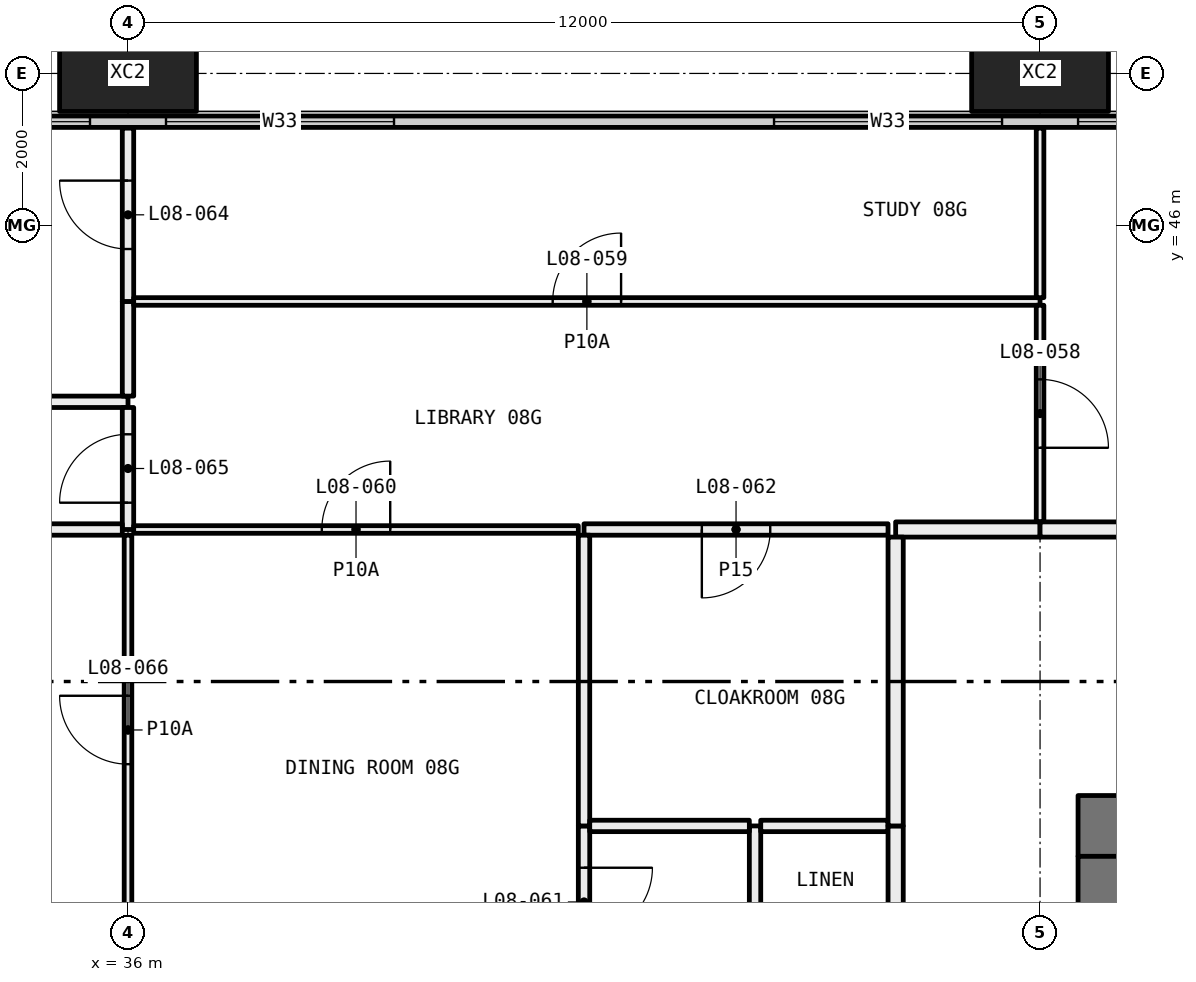
"""IFC4 building model, lengths in metres.
Left out: names, types, materials, properties, quantities, classifications, styles, units other than length and angle.
Written with IfcOpenShell. Run it as: python <this file> out.ifc"""

import sys

from ifc_helpers import new_model, si_unit, direction, frame, frame_2d, origin, origin_2d, place, context, subcontext, project, spatial, rectangle, hollow_rectangle, extrude, element, fill, save


model = new_model("IFC4")
c1 = context("Model", 3, precision=1e-05, world=origin(), true_north=direction((0.0, 1.0)))
c2 = subcontext(c1, "Body", "Model", "MODEL_VIEW")
j1 = project(units=[si_unit("LENGTHUNIT", "METRE"), si_unit("PLANEANGLEUNIT", "RADIAN")], contexts=[c1])
p1 = place(None, origin())
s1 = spatial("IfcSite", under=j1, at=p1, CompositionType="ELEMENT")
p2 = place(p1, origin())
s2 = spatial("IfcBuilding", under=s1, at=p2, CompositionType="ELEMENT")
p3 = place(p2, frame((0.0, 0.0, 40.35)))
s3 = spatial("IfcBuildingStorey", under=s2, at=p3, CompositionType="ELEMENT", Elevation=40.35)
for number, where, z_axis, x_axis in (
    (1, (36.0, 48.0, -0.4), (0.0, 0.0, 1.0), (1.0, 0.0, 0.0)),
    (2, (48.0, 48.0, -0.4), (0.0, 0.0, 1.0), (1.0, 0.0, 0.0)),
):
    element("IfcColumn", number, at=place(p3, frame(where, z_axis=z_axis, x_axis=x_axis)), inside=s3, PredefinedType="COLUMN", context=c2, shape_type="SweptSolid", body=[
        extrude(hollow_rectangle(XDim=1.8, YDim=1.0, WallThickness=0.07, at=origin_2d()), origin(), (0.0, 0.0, 1.0), 3.45),
    ])
p4 = place(p3, frame((6.56, 47.365, 0.0), z_axis=(0.0, 0.0, 1.0), x_axis=(1.0, 0.0, 0.0)))
e3 = element("IfcWall", 3, at=p4, inside=s3, PredefinedType="ELEMENTEDWALL", context=c2, shape_type="SweptSolid", body=[
    extrude(rectangle(XDim=58.88, YDim=0.15, at=frame_2d((29.44, 0.0))), origin(), (0.0, 0.0, 1.0), 3.05),
])
p5 = place(p4, frame((0.44, 0.0, 0.45)))
e4 = element("IfcOpeningElement", 4, at=p5, cuts=e3, PredefinedType="OPENING", context=c2, shape_type="SweptSolid", body=[
    extrude(rectangle(XDim=4.5, YDim=2.55, at=frame_2d((2.25, 1.275))), frame((0.0, 0.085, 0.0), z_axis=(0.0, -1.0, 0.0), x_axis=(1.0, 0.0, 0.0)), (0.0, 0.0, 1.0), 0.17),
])
p6 = place(p4, frame((5.94, 0.0, 0.45)))
e5 = element("IfcOpeningElement", 5, at=p6, cuts=e3, PredefinedType="OPENING", context=c2, shape_type="SweptSolid", body=[
    extrude(rectangle(XDim=3.0, YDim=2.55, at=frame_2d((1.5, 1.275))), frame((0.0, 0.085, 0.0), z_axis=(0.0, -1.0, 0.0), x_axis=(1.0, 0.0, 0.0)), (0.0, 0.0, 1.0), 0.17),
])
p7 = place(p4, frame((13.94, 0.0, 0.45)))
e6 = element("IfcOpeningElement", 6, at=p7, cuts=e3, PredefinedType="OPENING", context=c2, shape_type="SweptSolid", body=[
    extrude(rectangle(XDim=3.0, YDim=2.55, at=frame_2d((1.5, 1.275))), frame((0.0, 0.085, 0.0), z_axis=(0.0, -1.0, 0.0), x_axis=(1.0, 0.0, 0.0)), (0.0, 0.0, 1.0), 0.17),
])
p8 = place(p4, frame((17.94, 0.0, 0.45)))
e7 = element("IfcOpeningElement", 7, at=p8, cuts=e3, PredefinedType="OPENING", context=c2, shape_type="SweptSolid", body=[
    extrude(rectangle(XDim=3.0, YDim=2.55, at=frame_2d((1.5, 1.275))), frame((0.0, 0.085, 0.0), z_axis=(0.0, -1.0, 0.0), x_axis=(1.0, 0.0, 0.0)), (0.0, 0.0, 1.0), 0.17),
])
p9 = place(p4, frame((26.94, 0.0, 0.45)))
e8 = element("IfcOpeningElement", 8, at=p9, cuts=e3, PredefinedType="OPENING", context=c2, shape_type="SweptSolid", body=[
    extrude(rectangle(XDim=2.0, YDim=2.55, at=frame_2d((1.0, 1.275))), frame((0.0, 0.085, 0.0), z_axis=(0.0, -1.0, 0.0), x_axis=(1.0, 0.0, 0.0)), (0.0, 0.0, 1.0), 0.17),
])
p10 = place(p4, frame((29.94, 0.0, 0.45)))
e9 = element("IfcOpeningElement", 9, at=p10, cuts=e3, PredefinedType="OPENING", context=c2, shape_type="SweptSolid", body=[
    extrude(rectangle(XDim=3.0, YDim=2.55, at=frame_2d((1.5, 1.275))), frame((0.0, 0.085, 0.0), z_axis=(0.0, -1.0, 0.0), x_axis=(1.0, 0.0, 0.0)), (0.0, 0.0, 1.0), 0.17),
])
p11 = place(p4, frame((37.94, 0.0, 0.45)))
e10 = element("IfcOpeningElement", 10, at=p11, cuts=e3, PredefinedType="OPENING", context=c2, shape_type="SweptSolid", body=[
    extrude(rectangle(XDim=3.0, YDim=2.55, at=frame_2d((1.5, 1.275))), frame((0.0, 0.085, 0.0), z_axis=(0.0, -1.0, 0.0), x_axis=(1.0, 0.0, 0.0)), (0.0, 0.0, 1.0), 0.17),
])
p12 = place(p4, frame((41.94, 0.0, 0.45)))
e11 = element("IfcOpeningElement", 11, at=p12, cuts=e3, PredefinedType="OPENING", context=c2, shape_type="SweptSolid", body=[
    extrude(rectangle(XDim=3.0, YDim=2.55, at=frame_2d((1.5, 1.275))), frame((0.0, 0.085, 0.0), z_axis=(0.0, -1.0, 0.0), x_axis=(1.0, 0.0, 0.0)), (0.0, 0.0, 1.0), 0.17),
])
p13 = place(p4, frame((50.94, 0.0, 0.45)))
e12 = element("IfcOpeningElement", 12, at=p13, cuts=e3, PredefinedType="OPENING", context=c2, shape_type="SweptSolid", body=[
    extrude(rectangle(XDim=2.0, YDim=2.55, at=frame_2d((1.0, 1.275))), frame((0.0, 0.085, 0.0), z_axis=(0.0, -1.0, 0.0), x_axis=(1.0, 0.0, 0.0)), (0.0, 0.0, 1.0), 0.17),
])
p14 = place(p4, frame((53.94, 0.0, 0.45)))
e13 = element("IfcOpeningElement", 13, at=p14, cuts=e3, PredefinedType="OPENING", context=c2, shape_type="SweptSolid", body=[
    extrude(rectangle(XDim=4.5, YDim=2.55, at=frame_2d((2.25, 1.275))), frame((0.0, 0.085, 0.0), z_axis=(0.0, -1.0, 0.0), x_axis=(1.0, 0.0, 0.0)), (0.0, 0.0, 1.0), 0.17),
])
p15 = place(p3, frame((30.1, 43.68, 0.0), z_axis=(0.0, 0.0, 1.0), x_axis=(1.0, 0.0, 0.0)))
e14 = element("IfcWall", 14, at=p15, inside=s3, PredefinedType="PARTITIONING", context=c2, shape_type="SweptSolid", body=[
    extrude(rectangle(XDim=5.9, YDim=0.15, at=frame_2d((2.95, 0.0))), origin(), (0.0, 0.0, 1.0), 2.45),
])
p16 = place(p3, frame((36.0, 43.755, 0.0), z_axis=(0.0, 0.0, 1.0), x_axis=(0.0, 1.0, 0.0)))
e15 = element("IfcWall", 15, at=p16, inside=s3, PredefinedType="PARTITIONING", context=c2, shape_type="SweptSolid", body=[
    extrude(rectangle(XDim=1.245, YDim=0.15, at=frame_2d((0.623, 0.0))), origin(), (0.0, 0.0, 1.0), 2.45),
])
p17 = place(p3, frame((36.0, 45.0, 0.0), z_axis=(0.0, 0.0, 1.0), x_axis=(0.0, 1.0, 0.0)))
e16 = element("IfcWall", 16, at=p17, inside=s3, PredefinedType="PARTITIONING", context=c2, shape_type="SweptSolid", body=[
    extrude(rectangle(XDim=2.28, YDim=0.15, at=frame_2d((1.14, 0.0))), origin(), (0.0, 0.0, 1.0), 2.45),
])
p18 = place(p17, frame((0.69, 0.0, 0.0)))
e17 = element("IfcOpeningElement", 17, at=p18, cuts=e16, PredefinedType="OPENING", context=c2, shape_type="SweptSolid", body=[
    extrude(rectangle(XDim=0.9, YDim=2.1, at=frame_2d((0.45, 1.05))), frame((0.0, 0.085, 0.0), z_axis=(0.0, -1.0, 0.0), x_axis=(1.0, 0.0, 0.0)), (0.0, 0.0, 1.0), 0.17),
])
p19 = place(p3, frame((36.0, 42.0, 0.0), z_axis=(0.0, 0.0, 1.0), x_axis=(0.0, 1.0, 0.0)))
e18 = element("IfcWall", 18, at=p19, inside=s3, PredefinedType="PARTITIONING", context=c2, shape_type="SweptSolid", body=[
    extrude(rectangle(XDim=1.605, YDim=0.15, at=frame_2d((0.802, 0.0))), origin(), (0.0, 0.0, 1.0), 2.45),
])
p20 = place(p19, frame((0.353, 0.0, 0.0)))
e19 = element("IfcOpeningElement", 19, at=p20, cuts=e18, PredefinedType="OPENING", context=c2, shape_type="SweptSolid", body=[
    extrude(rectangle(XDim=0.9, YDim=2.1, at=frame_2d((0.45, 1.05))), frame((0.0, 0.085, 0.0), z_axis=(0.0, -1.0, 0.0), x_axis=(1.0, 0.0, 0.0)), (0.0, 0.0, 1.0), 0.17),
])
p21 = place(p3, frame((30.1, 42.0, 0.0), z_axis=(0.0, 0.0, 1.0), x_axis=(1.0, 0.0, 0.0)))
e20 = element("IfcWall", 20, at=p21, inside=s3, PredefinedType="PARTITIONING", context=c2, shape_type="SweptSolid", body=[
    extrude(rectangle(XDim=5.825, YDim=0.15, at=frame_2d((2.913, 0.0))), origin(), (0.0, 0.0, 1.0), 2.45),
])
p22 = place(p3, frame((48.0, 45.0, 0.0), z_axis=(0.0, 0.0, 1.0), x_axis=(-1.0, 0.0, 0.0)))
e21 = element("IfcWall", 21, at=p22, inside=s3, PredefinedType="PARTITIONING", context=c2, shape_type="SweptSolid", body=[
    extrude(rectangle(XDim=11.925, YDim=0.1, at=frame_2d((5.962, 0.0))), origin(), (0.0, 0.0, 1.0), 2.45),
])
p23 = place(p22, frame((5.512, 0.0, 0.0)))
e22 = element("IfcOpeningElement", 22, at=p23, cuts=e21, PredefinedType="OPENING", context=c2, shape_type="SweptSolid", body=[
    extrude(rectangle(XDim=0.9, YDim=2.1, at=frame_2d((0.45, 1.05))), frame((0.0, 0.06, 0.0), z_axis=(0.0, -1.0, 0.0), x_axis=(1.0, 0.0, 0.0)), (0.0, 0.0, 1.0), 0.12),
])
p24 = place(p3, frame((48.0, 42.1, 0.0), z_axis=(0.0, 0.0, 1.0), x_axis=(0.0, 1.0, 0.0)))
e23 = element("IfcWall", 23, at=p24, inside=s3, PredefinedType="PARTITIONING", context=c2, shape_type="SweptSolid", body=[
    extrude(rectangle(XDim=2.85, YDim=0.1, at=frame_2d((1.425, 0.0))), origin(), (0.0, 0.0, 1.0), 3.05),
])
p25 = place(p24, frame((0.975, 0.0, 0.0)))
e24 = element("IfcOpeningElement", 24, at=p25, cuts=e23, PredefinedType="OPENING", context=c2, shape_type="SweptSolid", body=[
    extrude(rectangle(XDim=0.9, YDim=2.1, at=frame_2d((0.45, 1.05))), frame((0.0, 0.06, 0.0), z_axis=(0.0, -1.0, 0.0), x_axis=(1.0, 0.0, 0.0)), (0.0, 0.0, 1.0), 0.12),
])
p26 = place(p3, frame((36.075, 42.0, 0.0), z_axis=(0.0, 0.0, 1.0), x_axis=(1.0, 0.0, 0.0)))
e25 = element("IfcWall", 25, at=p26, inside=s3, PredefinedType="PARTITIONING", context=c2, shape_type="SweptSolid", body=[
    extrude(rectangle(XDim=5.85, YDim=0.1, at=frame_2d((2.925, 0.0))), origin(), (0.0, 0.0, 1.0), 2.45),
])
p27 = place(p26, frame((2.475, 0.0, 0.0)))
e26 = element("IfcOpeningElement", 26, at=p27, cuts=e25, PredefinedType="OPENING", context=c2, shape_type="SweptSolid", body=[
    extrude(rectangle(XDim=0.9, YDim=2.1, at=frame_2d((0.45, 1.05))), frame((0.0, 0.06, 0.0), z_axis=(0.0, -1.0, 0.0), x_axis=(1.0, 0.0, 0.0)), (0.0, 0.0, 1.0), 0.12),
])
p28 = place(p3, frame((42.0, 42.0, 0.0), z_axis=(0.0, 0.0, 1.0), x_axis=(1.0, 0.0, 0.0)))
e27 = element("IfcWall", 27, at=p28, inside=s3, PredefinedType="PARTITIONING", context=c2, shape_type="SweptSolid", body=[
    extrude(rectangle(XDim=4.0, YDim=0.15, at=frame_2d((2.0, 0.0))), origin(), (0.0, 0.0, 1.0), 3.05),
])
p29 = place(p28, frame((1.55, 0.0, 0.0)))
e28 = element("IfcOpeningElement", 28, at=p29, cuts=e27, PredefinedType="OPENING", context=c2, shape_type="SweptSolid", body=[
    extrude(rectangle(XDim=0.9, YDim=2.1, at=frame_2d((0.45, 1.05))), frame((0.0, 0.085, 0.0), z_axis=(0.0, -1.0, 0.0), x_axis=(1.0, 0.0, 0.0)), (0.0, 0.0, 1.0), 0.17),
])
p30 = place(p3, frame((46.1, 42.0, 0.0), z_axis=(0.0, 0.0, 1.0), x_axis=(1.0, 0.0, 0.0)))
e29 = element("IfcWall", 29, at=p30, inside=s3, PredefinedType="PARTITIONING", context=c2, shape_type="SweptSolid", body=[
    extrude(rectangle(XDim=1.9, YDim=0.2, at=frame_2d((0.95, 0.0))), origin(), (0.0, 0.0, 1.0), 3.05),
])
p31 = place(p3, frame((48.0, 45.05, 0.0), z_axis=(0.0, 0.0, 1.0), x_axis=(0.0, 1.0, 0.0)))
e30 = element("IfcWall", 30, at=p31, inside=s3, PredefinedType="PARTITIONING", context=c2, shape_type="SweptSolid", body=[
    extrude(rectangle(XDim=2.23, YDim=0.1, at=frame_2d((1.115, 0.0))), origin(), (0.0, 0.0, 1.0), 3.05),
])
p32 = place(p3, frame((48.0, 42.0, 0.0), z_axis=(0.0, 0.0, 1.0), x_axis=(1.0, 0.0, 0.0)))
e31 = element("IfcWall", 31, at=p32, inside=s3, PredefinedType="PARTITIONING", context=c2, shape_type="SweptSolid", body=[
    extrude(rectangle(XDim=6.0, YDim=0.2, at=frame_2d((3.0, 0.0))), origin(), (0.0, 0.0, 1.0), 3.05),
])
p33 = place(p3, frame((36.0, 36.8, 0.0), z_axis=(0.0, 0.0, 1.0), x_axis=(0.0, 1.0, 0.0)))
e32 = element("IfcWall", 32, at=p33, inside=s3, PredefinedType="PARTITIONING", context=c2, shape_type="SweptSolid", body=[
    extrude(rectangle(XDim=5.125, YDim=0.1, at=frame_2d((2.562, 0.0))), origin(), (0.0, 0.0, 1.0), 2.45),
])
p34 = place(p33, frame((2.113, 0.0, 0.0)))
e33 = element("IfcOpeningElement", 33, at=p34, cuts=e32, PredefinedType="OPENING", context=c2, shape_type="SweptSolid", body=[
    extrude(rectangle(XDim=0.9, YDim=2.1, at=frame_2d((0.45, 1.05))), frame((0.0, 0.06, 0.0), z_axis=(0.0, -1.0, 0.0), x_axis=(1.0, 0.0, 0.0)), (0.0, 0.0, 1.0), 0.12),
])
p35 = place(p3, frame((42.0, 36.1, 0.0), z_axis=(0.0, 0.0, 1.0), x_axis=(0.0, 1.0, 0.0)))
e34 = element("IfcWall", 34, at=p35, inside=s3, PredefinedType="PARTITIONING", context=c2, shape_type="SweptSolid", body=[
    extrude(rectangle(XDim=2.0, YDim=0.15, at=frame_2d((1.0, 0.0))), origin(), (0.0, 0.0, 1.0), 3.05),
])
p36 = place(p35, frame((0.55, 0.0, 0.0)))
e35 = element("IfcOpeningElement", 35, at=p36, cuts=e34, PredefinedType="OPENING", context=c2, shape_type="SweptSolid", body=[
    extrude(rectangle(XDim=0.9, YDim=2.1, at=frame_2d((0.45, 1.05))), frame((0.0, 0.085, 0.0), z_axis=(0.0, -1.0, 0.0), x_axis=(1.0, 0.0, 0.0)), (0.0, 0.0, 1.0), 0.17),
])
p37 = place(p3, frame((42.0, 38.1, 0.0), z_axis=(0.0, 0.0, 1.0), x_axis=(0.0, 1.0, 0.0)))
e36 = element("IfcWall", 36, at=p37, inside=s3, PredefinedType="PARTITIONING", context=c2, shape_type="SweptSolid", body=[
    extrude(rectangle(XDim=3.825, YDim=0.15, at=frame_2d((1.913, 0.0))), origin(), (0.0, 0.0, 1.0), 3.05),
])
p38 = place(p3, frame((44.25, 36.1, 0.0), z_axis=(0.0, 0.0, 1.0), x_axis=(0.0, 1.0, 0.0)))
e37 = element("IfcWall", 37, at=p38, inside=s3, PredefinedType="PARTITIONING", context=c2, shape_type="SweptSolid", body=[
    extrude(rectangle(XDim=2.0, YDim=0.15, at=frame_2d((1.0, 0.0))), origin(), (0.0, 0.0, 1.0), 3.05),
])
p39 = place(p3, frame((44.175, 38.1, 0.0), z_axis=(0.0, 0.0, 1.0), x_axis=(-1.0, 0.0, 0.0)))
e38 = element("IfcWall", 38, at=p39, inside=s3, PredefinedType="PARTITIONING", context=c2, shape_type="SweptSolid", body=[
    extrude(rectangle(XDim=2.1, YDim=0.15, at=frame_2d((1.05, 0.0))), origin(), (0.0, 0.0, 1.0), 3.05),
])
p40 = place(p3, frame((46.0, 38.1, 0.0), z_axis=(0.0, 0.0, 1.0), x_axis=(-1.0, 0.0, 0.0)))
e39 = element("IfcWall", 39, at=p40, inside=s3, PredefinedType="PARTITIONING", context=c2, shape_type="SweptSolid", body=[
    extrude(rectangle(XDim=1.675, YDim=0.15, at=frame_2d((0.837, 0.0))), origin(), (0.0, 0.0, 1.0), 3.05),
])
p41 = place(p3, frame((46.1, 36.1, 0.0), z_axis=(0.0, 0.0, 1.0), x_axis=(0.0, 1.0, 0.0)))
e40 = element("IfcWall", 40, at=p41, inside=s3, PredefinedType="PARTITIONING", context=c2, shape_type="SweptSolid", body=[
    extrude(rectangle(XDim=2.0, YDim=0.2, at=frame_2d((1.0, 0.0))), origin(), (0.0, 0.0, 1.0), 3.05),
])
p42 = place(p3, frame((46.1, 38.1, 0.0), z_axis=(0.0, 0.0, 1.0), x_axis=(0.0, 1.0, 0.0)))
e41 = element("IfcWall", 41, at=p42, inside=s3, PredefinedType="PARTITIONING", context=c2, shape_type="SweptSolid", body=[
    extrude(rectangle(XDim=3.8, YDim=0.2, at=frame_2d((1.9, 0.0))), origin(), (0.0, 0.0, 1.0), 3.05),
])
p43 = place(p3, frame((59.5, 38.1, 0.0), z_axis=(0.0, 0.0, 1.0), x_axis=(-1.0, 0.0, 0.0)))
e42 = element("IfcWall", 42, at=p43, inside=s3, PredefinedType="SHEAR", context=c2, shape_type="SweptSolid", body=[
    extrude(rectangle(XDim=11.0, YDim=0.8, at=frame_2d((5.5, 0.0))), origin(), (0.0, 0.0, 1.0), 3.05),
])
p44 = place(p43, frame((8.4, 0.0, 0.0)))
e43 = element("IfcOpeningElement", 43, at=p44, cuts=e42, PredefinedType="OPENING", context=c2, shape_type="SweptSolid", body=[
    extrude(rectangle(XDim=1.6, YDim=2.1, at=frame_2d((0.8, 1.05))), frame((0.0, 0.41, 0.0), z_axis=(0.0, -1.0, 0.0), x_axis=(1.0, 0.0, 0.0)), (0.0, 0.0, 1.0), 0.82),
])
p45 = place(p3, frame((48.9, 22.3, 0.0), z_axis=(0.0, 0.0, 1.0), x_axis=(0.0, 1.0, 0.0)))
e44 = element("IfcWall", 44, at=p45, inside=s3, PredefinedType="SHEAR", context=c2, shape_type="SweptSolid", body=[
    extrude(rectangle(XDim=15.4, YDim=0.8, at=frame_2d((7.7, 0.0))), origin(), (0.0, 0.0, 1.0), 3.05),
])
p46 = place(p45, frame((6.9, 0.0, 0.0)))
e45 = element("IfcOpeningElement", 45, at=p46, cuts=e44, PredefinedType="OPENING", context=c2, shape_type="SweptSolid", body=[
    extrude(rectangle(XDim=1.6, YDim=2.1, at=frame_2d((0.8, 1.05))), frame((0.0, 0.41, 0.0), z_axis=(0.0, -1.0, 0.0), x_axis=(1.0, 0.0, 0.0)), (0.0, 0.0, 1.0), 0.82),
])
p47 = place(p9, origin())
e46 = element("IfcWindow", 46, at=p47, inside=s3, PartitioningType="SINGLE_PANEL", PredefinedType="WINDOW", context=c2, shape_type="SweptSolid", body=[
    extrude(rectangle(XDim=2.0, YDim=2.55, at=frame_2d((1.0, 1.275))), frame((0.0, 0.03, 0.0), z_axis=(0.0, -1.0, 0.0), x_axis=(1.0, 0.0, 0.0)), (0.0, 0.0, 1.0), 0.06),
])
fill(e8, e46)
p48 = place(p10, origin())
e47 = element("IfcWindow", 47, at=p48, inside=s3, PartitioningType="SINGLE_PANEL", PredefinedType="WINDOW", context=c2, shape_type="SweptSolid", body=[
    extrude(rectangle(XDim=3.0, YDim=2.55, at=frame_2d((1.5, 1.275))), frame((0.0, 0.03, 0.0), z_axis=(0.0, -1.0, 0.0), x_axis=(1.0, 0.0, 0.0)), (0.0, 0.0, 1.0), 0.06),
])
fill(e9, e47)
p49 = place(p11, origin())
e48 = element("IfcWindow", 48, at=p49, inside=s3, PartitioningType="SINGLE_PANEL", PredefinedType="WINDOW", context=c2, shape_type="SweptSolid", body=[
    extrude(rectangle(XDim=3.0, YDim=2.55, at=frame_2d((1.5, 1.275))), frame((0.0, 0.03, 0.0), z_axis=(0.0, -1.0, 0.0), x_axis=(1.0, 0.0, 0.0)), (0.0, 0.0, 1.0), 0.06),
])
fill(e10, e48)
p50 = place(p12, origin())
e49 = element("IfcWindow", 49, at=p50, inside=s3, PartitioningType="SINGLE_PANEL", PredefinedType="WINDOW", context=c2, shape_type="SweptSolid", body=[
    extrude(rectangle(XDim=3.0, YDim=2.55, at=frame_2d((1.5, 1.275))), frame((0.0, 0.03, 0.0), z_axis=(0.0, -1.0, 0.0), x_axis=(1.0, 0.0, 0.0)), (0.0, 0.0, 1.0), 0.06),
])
fill(e11, e49)
p51 = place(p25, frame((0.9, 0.0, 0.0), x_axis=(-1.0, 0.0, 0.0)))
e50 = element("IfcDoor", 50, at=p51, inside=s3, OperationType="SINGLE_SWING_LEFT", PredefinedType="DOOR", context=c2, shape_type="SweptSolid", body=[
    extrude(rectangle(XDim=0.9, YDim=2.1, at=frame_2d((0.45, 1.05))), frame((0.0, 0.025, 0.0), z_axis=(0.0, -1.0, 0.0), x_axis=(1.0, 0.0, 0.0)), (0.0, 0.0, 1.0), 0.05),
])
fill(e24, e50)
p52 = place(p23, frame((0.9, 0.0, 0.0), x_axis=(-1.0, 0.0, 0.0)))
e51 = element("IfcDoor", 51, at=p52, inside=s3, OperationType="SINGLE_SWING_LEFT", PredefinedType="DOOR", context=c2, shape_type="SweptSolid", body=[
    extrude(rectangle(XDim=0.9, YDim=2.1, at=frame_2d((0.45, 1.05))), frame((0.0, 0.025, 0.0), z_axis=(0.0, -1.0, 0.0), x_axis=(1.0, 0.0, 0.0)), (0.0, 0.0, 1.0), 0.05),
])
fill(e22, e51)
p53 = place(p27, origin())
e52 = element("IfcDoor", 52, at=p53, inside=s3, OperationType="SINGLE_SWING_LEFT", PredefinedType="DOOR", context=c2, shape_type="SweptSolid", body=[
    extrude(rectangle(XDim=0.9, YDim=2.1, at=frame_2d((0.45, 1.05))), frame((0.0, 0.025, 0.0), z_axis=(0.0, -1.0, 0.0), x_axis=(1.0, 0.0, 0.0)), (0.0, 0.0, 1.0), 0.05),
])
fill(e26, e52)
p54 = place(p36, frame((0.9, 0.0, 0.0), x_axis=(-1.0, 0.0, 0.0)))
e53 = element("IfcDoor", 53, at=p54, inside=s3, OperationType="SINGLE_SWING_RIGHT", PredefinedType="DOOR", context=c2, shape_type="SweptSolid", body=[
    extrude(rectangle(XDim=0.9, YDim=2.1, at=frame_2d((0.45, 1.05))), frame((0.0, 0.025, 0.0), z_axis=(0.0, -1.0, 0.0), x_axis=(1.0, 0.0, 0.0)), (0.0, 0.0, 1.0), 0.05),
])
fill(e35, e53)
p55 = place(p29, frame((0.9, 0.0, 0.0), x_axis=(-1.0, 0.0, 0.0)))
e54 = element("IfcDoor", 54, at=p55, inside=s3, OperationType="SINGLE_SWING_LEFT", PredefinedType="DOOR", context=c2, shape_type="SweptSolid", body=[
    extrude(rectangle(XDim=0.9, YDim=2.1, at=frame_2d((0.45, 1.05))), frame((0.0, 0.025, 0.0), z_axis=(0.0, -1.0, 0.0), x_axis=(1.0, 0.0, 0.0)), (0.0, 0.0, 1.0), 0.05),
])
fill(e28, e54)
p56 = place(p18, origin())
e55 = element("IfcDoor", 55, at=p56, inside=s3, OperationType="SINGLE_SWING_LEFT", PredefinedType="DOOR", context=c2, shape_type="SweptSolid", body=[
    extrude(rectangle(XDim=0.9, YDim=2.1, at=frame_2d((0.45, 1.05))), frame((0.0, 0.025, 0.0), z_axis=(0.0, -1.0, 0.0), x_axis=(1.0, 0.0, 0.0)), (0.0, 0.0, 1.0), 0.05),
])
fill(e17, e55)
p57 = place(p20, origin())
e56 = element("IfcDoor", 56, at=p57, inside=s3, OperationType="SINGLE_SWING_RIGHT", PredefinedType="DOOR", context=c2, shape_type="SweptSolid", body=[
    extrude(rectangle(XDim=0.9, YDim=2.1, at=frame_2d((0.45, 1.05))), frame((0.0, 0.025, 0.0), z_axis=(0.0, -1.0, 0.0), x_axis=(1.0, 0.0, 0.0)), (0.0, 0.0, 1.0), 0.05),
])
fill(e19, e56)
p58 = place(p34, origin())
e57 = element("IfcDoor", 57, at=p58, inside=s3, OperationType="SINGLE_SWING_LEFT", PredefinedType="DOOR", context=c2, shape_type="SweptSolid", body=[
    extrude(rectangle(XDim=0.9, YDim=2.1, at=frame_2d((0.45, 1.05))), frame((0.0, 0.025, 0.0), z_axis=(0.0, -1.0, 0.0), x_axis=(1.0, 0.0, 0.0)), (0.0, 0.0, 1.0), 0.05),
])
fill(e33, e57)
save(model, sys.argv[1])
